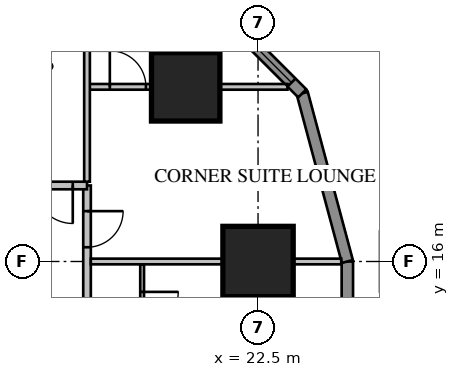
"""IFC4 building model, lengths in metres.
Left out: names, types, materials, properties, quantities, classifications, styles, units other than length and angle.
Written with IfcOpenShell. Run it as: python <this file> out.ifc"""

import sys

from ifc_helpers import new_model, si_unit, direction, frame, frame_2d, origin, origin_2d, place, context, subcontext, project, spatial, rectangle, extrude, element, fill, save


model = new_model("IFC4")
c1 = context("Model", 3, precision=1e-05, world=origin(), true_north=direction((0.0, 1.0)))
c2 = subcontext(c1, "Body", "Model", "MODEL_VIEW")
j1 = project(units=[si_unit("LENGTHUNIT", "METRE"), si_unit("PLANEANGLEUNIT", "RADIAN")], contexts=[c1])
p1 = place(None, origin())
s1 = spatial("IfcSite", under=j1, at=p1, CompositionType="ELEMENT")
p2 = place(p1, origin())
s2 = spatial("IfcBuilding", under=s1, at=p2, CompositionType="ELEMENT")
p3 = place(p2, frame((0.0, 0.0, 31.4)))
s3 = spatial("IfcBuildingStorey", under=s2, at=p3, CompositionType="ELEMENT", Elevation=31.4)
p4 = place(p3, frame((22.5, 16.0, 0.0), z_axis=(0.0, 0.0, 1.0), x_axis=(1.0, 0.0, 0.0)))
e1 = element("IfcColumn", 1, at=p4, inside=s3, PredefinedType="COLUMN", context=c2, shape_type="SweptSolid", body=[
    extrude(rectangle(XDim=1.85, YDim=1.85, at=origin_2d()), origin(), (0.0, 0.0, 1.0), 3.85),
])
p5 = place(p3, frame((20.596, 20.596, 0.0), z_axis=(0.0, 0.0, 1.0), x_axis=(1.0, 0.0, 0.0)))
e2 = element("IfcColumn", 2, at=p5, inside=s3, PredefinedType="COLUMN", context=c2, shape_type="SweptSolid", body=[
    extrude(rectangle(XDim=1.8, YDim=1.8, at=origin_2d()), origin(), (0.0, 0.0, 1.0), 3.85),
])
p6 = place(p3, frame((24.85, -16.0, 0.0), z_axis=(0.0, 0.0, 1.0), x_axis=(0.0, 1.0, 0.0)))
e3 = element("IfcWall", 3, at=p6, inside=s3, PredefinedType="SOLIDWALL", context=c2, shape_type="SweptSolid", body=[
    extrude(rectangle(XDim=32.0, YDim=0.3, at=frame_2d((16.0, 0.0))), origin(), (0.0, 0.0, 1.0), 3.65),
])
p7 = place(p6, frame((1.2, 0.0, 0.75)))
e4 = element("IfcOpeningElement", 4, at=p7, cuts=e3, PredefinedType="OPENING", context=c2, shape_type="SweptSolid", body=[
    extrude(rectangle(XDim=1.6, YDim=1.8, at=frame_2d((0.8, 0.9))), frame((0.0, 0.17, 0.0), z_axis=(0.0, -1.0, 0.0), x_axis=(1.0, 0.0, 0.0)), (0.0, 0.0, 1.0), 0.34),
])
p8 = place(p6, frame((5.2, 0.0, 0.75)))
e5 = element("IfcOpeningElement", 5, at=p8, cuts=e3, PredefinedType="OPENING", context=c2, shape_type="SweptSolid", body=[
    extrude(rectangle(XDim=1.6, YDim=1.8, at=frame_2d((0.8, 0.9))), frame((0.0, 0.17, 0.0), z_axis=(0.0, -1.0, 0.0), x_axis=(1.0, 0.0, 0.0)), (0.0, 0.0, 1.0), 0.34),
])
p9 = place(p6, frame((17.2, 0.0, 0.75)))
e6 = element("IfcOpeningElement", 6, at=p9, cuts=e3, PredefinedType="OPENING", context=c2, shape_type="SweptSolid", body=[
    extrude(rectangle(XDim=1.6, YDim=1.8, at=frame_2d((0.8, 0.9))), frame((0.0, 0.17, 0.0), z_axis=(0.0, -1.0, 0.0), x_axis=(1.0, 0.0, 0.0)), (0.0, 0.0, 1.0), 0.34),
])
p10 = place(p6, frame((21.2, 0.0, 0.75)))
e7 = element("IfcOpeningElement", 7, at=p10, cuts=e3, PredefinedType="OPENING", context=c2, shape_type="SweptSolid", body=[
    extrude(rectangle(XDim=1.6, YDim=1.8, at=frame_2d((0.8, 0.9))), frame((0.0, 0.17, 0.0), z_axis=(0.0, -1.0, 0.0), x_axis=(1.0, 0.0, 0.0)), (0.0, 0.0, 1.0), 0.34),
])
p11 = place(p6, frame((25.2, 0.0, 0.75)))
e8 = element("IfcOpeningElement", 8, at=p11, cuts=e3, PredefinedType="OPENING", context=c2, shape_type="SweptSolid", body=[
    extrude(rectangle(XDim=1.6, YDim=1.8, at=frame_2d((0.8, 0.9))), frame((0.0, 0.17, 0.0), z_axis=(0.0, -1.0, 0.0), x_axis=(1.0, 0.0, 0.0)), (0.0, 0.0, 1.0), 0.34),
])
p12 = place(p6, frame((29.2, 0.0, 0.75)))
e9 = element("IfcOpeningElement", 9, at=p12, cuts=e3, PredefinedType="OPENING", context=c2, shape_type="SweptSolid", body=[
    extrude(rectangle(XDim=1.6, YDim=1.8, at=frame_2d((0.8, 0.9))), frame((0.0, 0.17, 0.0), z_axis=(0.0, -1.0, 0.0), x_axis=(1.0, 0.0, 0.0)), (0.0, 0.0, 1.0), 0.34),
])
p13 = place(p6, frame((8.8, 0.0, 0.75)))
e10 = element("IfcOpeningElement", 10, at=p13, cuts=e3, PredefinedType="OPENING", context=c2, shape_type="SweptSolid", body=[
    extrude(rectangle(XDim=2.4, YDim=1.8, at=frame_2d((1.2, 0.9))), frame((0.0, 0.17, 0.0), z_axis=(0.0, -1.0, 0.0), x_axis=(1.0, 0.0, 0.0)), (0.0, 0.0, 1.0), 0.34),
])
p14 = place(p6, frame((13.812, 0.0, 0.0)))
e11 = element("IfcOpeningElement", 11, at=p14, cuts=e3, PredefinedType="OPENING", context=c2, shape_type="SweptSolid", body=[
    extrude(rectangle(XDim=1.0, YDim=2.4, at=frame_2d((0.5, 1.2))), frame((0.0, 0.17, 0.0), z_axis=(0.0, -1.0, 0.0), x_axis=(1.0, 0.0, 0.0)), (0.0, 0.0, 1.0), 0.34),
])
p15 = place(p3, frame((24.85, 16.0, 0.0), z_axis=(0.0, 0.0, 1.0), x_axis=(-0.258839972501, 0.965920218567, 0.0)))
e12 = element("IfcWall", 12, at=p15, inside=s3, PredefinedType="SOLIDWALL", context=c2, shape_type="SweptSolid", body=[
    extrude(rectangle(XDim=4.581, YDim=0.3, at=frame_2d((2.291, 0.0))), origin(), (0.0, 0.0, 1.0), 3.65),
])
p16 = place(p3, frame((23.664, 20.425, 0.0), z_axis=(0.0, 0.0, 1.0), x_axis=(-0.707106781187, 0.707106781187, 0.0)))
e13 = element("IfcWall", 13, at=p16, inside=s3, PredefinedType="SOLIDWALL", context=c2, shape_type="SweptSolid", body=[
    extrude(rectangle(XDim=4.581, YDim=0.3, at=frame_2d((2.291, 0.0))), origin(), (0.0, 0.0, 1.0), 3.65),
])
p17 = place(p16, frame((0.4, 0.0, 0.75)))
e14 = element("IfcOpeningElement", 14, at=p17, cuts=e13, PredefinedType="OPENING", context=c2, shape_type="SweptSolid", body=[
    extrude(rectangle(XDim=3.781, YDim=1.8, at=frame_2d((1.891, 0.9))), frame((0.0, 0.17, 0.0), z_axis=(0.0, -1.0, 0.0), x_axis=(1.0, 0.0, 0.0)), (0.0, 0.0, 1.0), 0.34),
])
p18 = place(p3, frame((18.0, -18.0, 0.0), z_axis=(0.0, 0.0, 1.0), x_axis=(0.0, 1.0, 0.0)))
e15 = element("IfcWall", 15, at=p18, inside=s3, PredefinedType="PARTITIONING", context=c2, shape_type="SweptSolid", body=[
    extrude(rectangle(XDim=36.0, YDim=0.2, at=frame_2d((18.0, 0.0))), origin(), (0.0, 0.0, 1.0), 3.65),
])
p19 = place(p18, frame((10.4, 0.0, 0.0)))
e16 = element("IfcOpeningElement", 16, at=p19, cuts=e15, PredefinedType="OPENING", context=c2, shape_type="SweptSolid", body=[
    extrude(rectangle(XDim=1.0, YDim=2.1, at=frame_2d((0.5, 1.05))), frame((0.0, 0.12, 0.0), z_axis=(0.0, -1.0, 0.0), x_axis=(1.0, 0.0, 0.0)), (0.0, 0.0, 1.0), 0.24),
])
p20 = place(p18, frame((0.375, 0.0, 0.0)))
e17 = element("IfcOpeningElement", 17, at=p20, cuts=e15, PredefinedType="OPENING", context=c2, shape_type="SweptSolid", body=[
    extrude(rectangle(XDim=1.0, YDim=2.1, at=frame_2d((0.5, 1.05))), frame((0.0, 0.12, 0.0), z_axis=(0.0, -1.0, 0.0), x_axis=(1.0, 0.0, 0.0)), (0.0, 0.0, 1.0), 0.24),
])
p21 = place(p18, frame((34.375, 0.0, 0.0)))
e18 = element("IfcOpeningElement", 18, at=p21, cuts=e15, PredefinedType="OPENING", context=c2, shape_type="SweptSolid", body=[
    extrude(rectangle(XDim=0.95, YDim=2.1, at=frame_2d((0.475, 1.05))), frame((0.0, 0.12, 0.0), z_axis=(0.0, -1.0, 0.0), x_axis=(1.0, 0.0, 0.0)), (0.0, 0.0, 1.0), 0.24),
])
p22 = place(p3, frame((19.45, -15.925, 0.0), z_axis=(0.0, 0.0, 1.0), x_axis=(0.0, 1.0, 0.0)))
e19 = element("IfcWall", 19, at=p22, inside=s3, PredefinedType="PARTITIONING", context=c2, shape_type="SweptSolid", body=[
    extrude(rectangle(XDim=31.85, YDim=0.1, at=frame_2d((15.925, 0.0))), origin(), (0.0, 0.0, 1.0), 3.65),
])
p23 = place(p22, frame((10.125, 0.0, 0.0)))
e20 = element("IfcOpeningElement", 20, at=p23, cuts=e19, PredefinedType="OPENING", context=c2, shape_type="SweptSolid", body=[
    extrude(rectangle(XDim=1.0, YDim=2.1, at=frame_2d((0.5, 1.05))), frame((0.0, 0.07, 0.0), z_axis=(0.0, -1.0, 0.0), x_axis=(1.0, 0.0, 0.0)), (0.0, 0.0, 1.0), 0.14),
])
p24 = place(p22, frame((8.3, 0.0, 0.0)))
e21 = element("IfcOpeningElement", 21, at=p24, cuts=e19, PredefinedType="OPENING", context=c2, shape_type="SweptSolid", body=[
    extrude(rectangle(XDim=0.8, YDim=2.1, at=frame_2d((0.4, 1.05))), frame((0.0, 0.07, 0.0), z_axis=(0.0, -1.0, 0.0), x_axis=(1.0, 0.0, 0.0)), (0.0, 0.0, 1.0), 0.14),
])
p25 = place(p22, frame((0.3, 0.0, 0.0)))
e22 = element("IfcOpeningElement", 22, at=p25, cuts=e19, PredefinedType="OPENING", context=c2, shape_type="SweptSolid", body=[
    extrude(rectangle(XDim=0.95, YDim=2.1, at=frame_2d((0.475, 1.05))), frame((0.0, 0.07, 0.0), z_axis=(0.0, -1.0, 0.0), x_axis=(1.0, 0.0, 0.0)), (0.0, 0.0, 1.0), 0.14),
])
p26 = place(p22, frame((6.175, 0.0, 0.0)))
e23 = element("IfcOpeningElement", 23, at=p26, cuts=e19, PredefinedType="OPENING", context=c2, shape_type="SweptSolid", body=[
    extrude(rectangle(XDim=0.95, YDim=2.1, at=frame_2d((0.475, 1.05))), frame((0.0, 0.07, 0.0), z_axis=(0.0, -1.0, 0.0), x_axis=(1.0, 0.0, 0.0)), (0.0, 0.0, 1.0), 0.14),
])
p27 = place(p22, frame((16.3, 0.0, 0.0)))
e24 = element("IfcOpeningElement", 24, at=p27, cuts=e19, PredefinedType="OPENING", context=c2, shape_type="SweptSolid", body=[
    extrude(rectangle(XDim=0.95, YDim=2.1, at=frame_2d((0.475, 1.05))), frame((0.0, 0.07, 0.0), z_axis=(0.0, -1.0, 0.0), x_axis=(1.0, 0.0, 0.0)), (0.0, 0.0, 1.0), 0.14),
])
p28 = place(p22, frame((22.175, 0.0, 0.0)))
e25 = element("IfcOpeningElement", 25, at=p28, cuts=e19, PredefinedType="OPENING", context=c2, shape_type="SweptSolid", body=[
    extrude(rectangle(XDim=0.95, YDim=2.1, at=frame_2d((0.475, 1.05))), frame((0.0, 0.07, 0.0), z_axis=(0.0, -1.0, 0.0), x_axis=(1.0, 0.0, 0.0)), (0.0, 0.0, 1.0), 0.14),
])
p29 = place(p22, frame((24.3, 0.0, 0.0)))
e26 = element("IfcOpeningElement", 26, at=p29, cuts=e19, PredefinedType="OPENING", context=c2, shape_type="SweptSolid", body=[
    extrude(rectangle(XDim=0.95, YDim=2.1, at=frame_2d((0.475, 1.05))), frame((0.0, 0.07, 0.0), z_axis=(0.0, -1.0, 0.0), x_axis=(1.0, 0.0, 0.0)), (0.0, 0.0, 1.0), 0.14),
])
p30 = place(p22, frame((30.175, 0.0, 0.0)))
e27 = element("IfcOpeningElement", 27, at=p30, cuts=e19, PredefinedType="OPENING", context=c2, shape_type="SweptSolid", body=[
    extrude(rectangle(XDim=0.95, YDim=2.1, at=frame_2d((0.475, 1.05))), frame((0.0, 0.07, 0.0), z_axis=(0.0, -1.0, 0.0), x_axis=(1.0, 0.0, 0.0)), (0.0, 0.0, 1.0), 0.14),
])
p31 = place(p3, frame((18.1, 16.0, 0.0), z_axis=(0.0, 0.0, 1.0), x_axis=(1.0, 0.0, 0.0)))
e28 = element("IfcWall", 28, at=p31, inside=s3, PredefinedType="PARTITIONING", context=c2, shape_type="SweptSolid", body=[
    extrude(rectangle(XDim=6.589, YDim=0.15, at=frame_2d((3.295, 0.0))), origin(), (0.0, 0.0, 1.0), 3.65),
])
p32 = place(p3, frame((18.065, 20.596, 0.0), z_axis=(0.0, 0.0, 1.0), x_axis=(1.0, 0.0, 0.0)))
e29 = element("IfcWall", 29, at=p32, inside=s3, PredefinedType="PARTITIONING", context=c2, shape_type="SweptSolid", body=[
    extrude(rectangle(XDim=5.209, YDim=0.15, at=frame_2d((2.604, 0.0))), origin(), (0.0, 0.0, 1.0), 3.65),
])
p33 = place(p32, frame((0.535, 0.0, 0.0)))
e30 = element("IfcOpeningElement", 30, at=p33, cuts=e29, PredefinedType="OPENING", context=c2, shape_type="SweptSolid", body=[
    extrude(rectangle(XDim=0.95, YDim=2.1, at=frame_2d((0.475, 1.05))), frame((0.0, 0.095, 0.0), z_axis=(0.0, -1.0, 0.0), x_axis=(1.0, 0.0, 0.0)), (0.0, 0.0, 1.0), 0.19),
])
p34 = place(p3, frame((18.0, 18.0, 0.0), z_axis=(0.0, 0.0, 1.0), x_axis=(-1.0, 0.0, 0.0)))
e31 = element("IfcWall", 31, at=p34, inside=s3, PredefinedType="PARTITIONING", context=c2, shape_type="SweptSolid", body=[
    extrude(rectangle(XDim=36.0, YDim=0.2, at=frame_2d((18.0, 0.0))), origin(), (0.0, 0.0, 1.0), 3.65),
])
p35 = place(p34, frame((10.4, 0.0, 0.0)))
e32 = element("IfcOpeningElement", 32, at=p35, cuts=e31, PredefinedType="OPENING", context=c2, shape_type="SweptSolid", body=[
    extrude(rectangle(XDim=1.0, YDim=2.1, at=frame_2d((0.5, 1.05))), frame((0.0, 0.12, 0.0), z_axis=(0.0, -1.0, 0.0), x_axis=(1.0, 0.0, 0.0)), (0.0, 0.0, 1.0), 0.24),
])
p36 = place(p34, frame((0.375, 0.0, 0.0)))
e33 = element("IfcOpeningElement", 33, at=p36, cuts=e31, PredefinedType="OPENING", context=c2, shape_type="SweptSolid", body=[
    extrude(rectangle(XDim=1.0, YDim=2.1, at=frame_2d((0.5, 1.05))), frame((0.0, 0.12, 0.0), z_axis=(0.0, -1.0, 0.0), x_axis=(1.0, 0.0, 0.0)), (0.0, 0.0, 1.0), 0.24),
])
p37 = place(p34, frame((34.375, 0.0, 0.0)))
e34 = element("IfcOpeningElement", 34, at=p37, cuts=e31, PredefinedType="OPENING", context=c2, shape_type="SweptSolid", body=[
    extrude(rectangle(XDim=0.95, YDim=2.1, at=frame_2d((0.475, 1.05))), frame((0.0, 0.12, 0.0), z_axis=(0.0, -1.0, 0.0), x_axis=(1.0, 0.0, 0.0)), (0.0, 0.0, 1.0), 0.24),
])
p38 = place(p3, frame((18.0, 18.1, 0.0), z_axis=(0.0, 0.0, 1.0), x_axis=(0.0, 1.0, 0.0)))
e35 = element("IfcWall", 35, at=p38, inside=s3, PredefinedType="PARTITIONING", context=c2, shape_type="SweptSolid", body=[
    extrude(rectangle(XDim=6.053, YDim=0.15, at=frame_2d((3.027, 0.0))), origin(), (0.0, 0.0, 1.0), 3.65),
])
p39 = place(p17, origin())
e36 = element("IfcWindow", 36, at=p39, inside=s3, PartitioningType="SINGLE_PANEL", PredefinedType="WINDOW", context=c2, shape_type="SweptSolid", body=[
    extrude(rectangle(XDim=3.781, YDim=1.8, at=frame_2d((1.891, 0.9))), frame((0.0, 0.03, 0.0), z_axis=(0.0, -1.0, 0.0), x_axis=(1.0, 0.0, 0.0)), (0.0, 0.0, 1.0), 0.06),
])
fill(e14, e36)
p40 = place(p30, origin())
e37 = element("IfcDoor", 37, at=p40, inside=s3, OperationType="SINGLE_SWING_RIGHT", PredefinedType="DOOR", context=c2, shape_type="SweptSolid", body=[
    extrude(rectangle(XDim=0.95, YDim=2.1, at=frame_2d((0.475, 1.05))), frame((0.0, 0.025, 0.0), z_axis=(0.0, -1.0, 0.0), x_axis=(1.0, 0.0, 0.0)), (0.0, 0.0, 1.0), 0.05),
])
fill(e27, e37)
p41 = place(p21, origin())
e38 = element("IfcDoor", 38, at=p41, inside=s3, OperationType="SINGLE_SWING_RIGHT", PredefinedType="DOOR", context=c2, shape_type="SweptSolid", body=[
    extrude(rectangle(XDim=0.95, YDim=2.1, at=frame_2d((0.475, 1.05))), frame((0.0, 0.025, 0.0), z_axis=(0.0, -1.0, 0.0), x_axis=(1.0, 0.0, 0.0)), (0.0, 0.0, 1.0), 0.05),
])
fill(e18, e38)
p42 = place(p33, origin())
e39 = element("IfcDoor", 39, at=p42, inside=s3, OperationType="SINGLE_SWING_LEFT", PredefinedType="DOOR", context=c2, shape_type="SweptSolid", body=[
    extrude(rectangle(XDim=0.95, YDim=2.1, at=frame_2d((0.475, 1.05))), frame((0.0, 0.025, 0.0), z_axis=(0.0, -1.0, 0.0), x_axis=(1.0, 0.0, 0.0)), (0.0, 0.0, 1.0), 0.05),
])
fill(e30, e39)
p43 = place(p36, origin())
e40 = element("IfcDoor", 40, at=p43, inside=s3, OperationType="SINGLE_SWING_LEFT", PredefinedType="DOOR", context=c2, shape_type="SweptSolid", body=[
    extrude(rectangle(XDim=1.0, YDim=2.1, at=frame_2d((0.5, 1.05))), frame((0.0, 0.025, 0.0), z_axis=(0.0, -1.0, 0.0), x_axis=(1.0, 0.0, 0.0)), (0.0, 0.0, 1.0), 0.05),
])
fill(e33, e40)
save(model, sys.argv[1])
